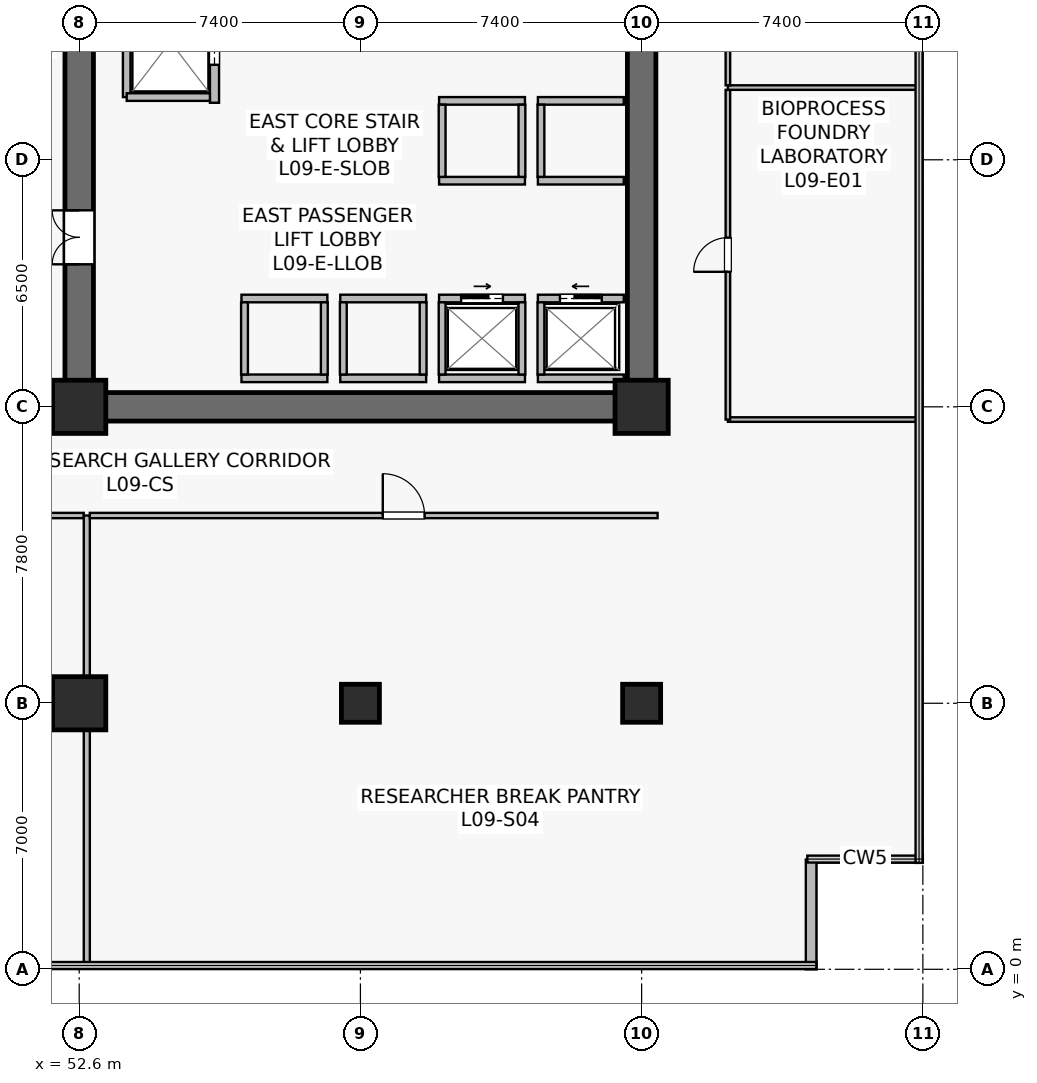
"""IFC4 building model, lengths in metres.
Left out: names, types, materials, properties, quantities, classifications, styles, units other than length and angle.
Written with IfcOpenShell. Run it as: python <this file> out.ifc"""

import sys

from ifc_helpers import new_model, si_unit, direction, frame, frame_2d, origin, origin_2d, place, context, subcontext, project, spatial, rectangle, extrude, source, transform, mapped, element, fill, save


model = new_model("IFC4")
c1 = context("Model", 3, precision=1e-05, world=origin(), true_north=direction((0.0, 1.0)))
c2 = subcontext(c1, "Body", "Model", "MODEL_VIEW")
j1 = project(units=[si_unit("LENGTHUNIT", "METRE"), si_unit("PLANEANGLEUNIT", "RADIAN")], contexts=[c1])
p1 = place(None, origin())
s1 = spatial("IfcSite", under=j1, at=p1, CompositionType="ELEMENT")
p2 = place(p1, origin())
s2 = spatial("IfcBuilding", under=s1, at=p2, CompositionType="ELEMENT")
p3 = place(p2, frame((0.0, 0.0, 37.5)))
s3 = spatial("IfcBuildingStorey", under=s2, at=p3, CompositionType="ELEMENT", Elevation=37.5)
p4 = place(p3, frame((52.225, 14.8, 0.0), z_axis=(0.0, 0.0, 1.0), x_axis=(1.0, 0.0, 0.0)))
e1 = element("IfcWall", 1, at=p4, inside=s3, PredefinedType="SHEAR", context=c2, shape_type="SweptSolid", body=[
    extrude(rectangle(XDim=15.55, YDim=0.75, at=frame_2d((7.775, 0.0))), origin(), (0.0, 0.0, 1.0), 3.78),
])
p5 = place(p3, frame((52.6, 15.175, 0.0), z_axis=(0.0, 0.0, 1.0), x_axis=(0.0, 1.0, 0.0)))
e2 = element("IfcWall", 2, at=p5, inside=s3, PredefinedType="SHEAR", context=c2, shape_type="SweptSolid", body=[
    extrude(rectangle(XDim=18.25, YDim=0.75, at=frame_2d((9.125, 0.0))), origin(), (0.0, 0.0, 1.0), 3.78),
])
p6 = place(p5, frame((3.375, 0.0, 0.0)))
e3 = element("IfcOpeningElement", 3, at=p6, cuts=e2, PredefinedType="OPENING", context=c2, shape_type="SweptSolid", body=[
    extrude(rectangle(XDim=1.42, YDim=2.2, at=frame_2d((0.71, 1.1))), frame((0.0, 0.385, 0.0), z_axis=(0.0, -1.0, 0.0), x_axis=(1.0, 0.0, 0.0)), (0.0, 0.0, 1.0), 0.77),
])
p7 = place(p3, frame((67.4, 15.175, 0.0), z_axis=(0.0, 0.0, 1.0), x_axis=(0.0, 1.0, 0.0)))
e4 = element("IfcWall", 4, at=p7, inside=s3, PredefinedType="SHEAR", context=c2, shape_type="SweptSolid", body=[
    extrude(rectangle(XDim=18.25, YDim=0.75, at=frame_2d((9.125, 0.0))), origin(), (0.0, 0.0, 1.0), 3.78),
])
m1 = source(origin(), c2, "Body", "SweptSolid", [
    extrude(rectangle(XDim=1.4, YDim=1.4, at=origin_2d()), origin(), (0.0, 0.0, 1.0), 4.1),
])
p8 = place(p3, frame((52.6, 7.0, 0.0), z_axis=(0.0, 0.0, 1.0), x_axis=(1.0, 0.0, 0.0)))
e5 = element("IfcColumn", 5, at=p8, inside=s3, PredefinedType="COLUMN", context=c2, shape_type="MappedRepresentation", body=[
    mapped(m1, transform((0.0, 0.0, 0.0), scale=1.0)),
])
m2 = source(origin(), c2, "Body", "SweptSolid", [
    extrude(rectangle(XDim=1.0, YDim=1.0, at=origin_2d()), origin(), (0.0, 0.0, 1.0), 4.1),
])
p9 = place(p3, frame((60.0, 7.0, 0.0), z_axis=(0.0, 0.0, 1.0), x_axis=(1.0, 0.0, 0.0)))
e6 = element("IfcColumn", 6, at=p9, inside=s3, PredefinedType="COLUMN", context=c2, shape_type="MappedRepresentation", body=[
    mapped(m2, transform((0.0, 0.0, 0.0), scale=1.0)),
])
for number, where, z_axis, x_axis in (
    (7, (52.6, 14.8, 0.0), (0.0, 0.0, 1.0), (1.0, 0.0, 0.0)),
    (8, (67.4, 14.8, 0.0), (0.0, 0.0, 1.0), (1.0, 0.0, 0.0)),
):
    element("IfcColumn", number, at=place(p3, frame(where, z_axis=z_axis, x_axis=x_axis)), inside=s3, PredefinedType="COLUMN", context=c2, shape_type="MappedRepresentation", body=[
        mapped(m1, transform((0.0, 0.0, 0.0), scale=1.0)),
    ])
p10 = place(p3, frame((67.4, 7.0, 0.0), z_axis=(0.0, 0.0, 1.0), x_axis=(1.0, 0.0, 0.0)))
e9 = element("IfcColumn", 9, at=p10, inside=s3, PredefinedType="COLUMN", context=c2, shape_type="MappedRepresentation", body=[
    mapped(m2, transform((0.0, 0.0, 0.0), scale=1.0)),
])
p11 = place(p3, frame((71.86, 0.0, 0.0), z_axis=(0.0, 0.0, 1.0), x_axis=(0.0, 1.0, 0.0)))
e10 = element("IfcWall", 10, at=p11, inside=s3, PredefinedType="STANDARD", context=c2, shape_type="SweptSolid", body=[
    extrude(rectangle(XDim=2.888, YDim=0.28, at=frame_2d((1.444, 0.0))), origin(), (0.0, 0.0, 1.0), 3.78),
])
p12 = place(p3, frame((56.16, 22.8, 0.0), z_axis=(0.0, 0.0, 1.0), x_axis=(0.0, 1.0, 0.0)))
e11 = element("IfcWall", 11, at=p12, inside=s3, PredefinedType="SOLIDWALL", context=c2, shape_type="SweptSolid", body=[
    extrude(rectangle(XDim=6.85, YDim=0.24, at=frame_2d((3.425, 0.0))), origin(), (0.0, 0.0, 1.0), 2.865),
])
p13 = place(p12, frame((4.85, 0.0, 0.0)))
e12 = element("IfcOpeningElement", 12, at=p13, cuts=e11, PredefinedType="OPENING", context=c2, shape_type="SweptSolid", body=[
    extrude(rectangle(XDim=1.1, YDim=2.22, at=frame_2d((0.55, 1.11))), frame((0.0, 0.13, 0.0), z_axis=(0.0, -1.0, 0.0), x_axis=(1.0, 0.0, 0.0)), (0.0, 0.0, 1.0), 0.26),
])
p14 = place(p12, frame((1.0, 0.0, 0.0)))
e13 = element("IfcOpeningElement", 13, at=p14, cuts=e11, PredefinedType="OPENING", context=c2, shape_type="SweptSolid", body=[
    extrude(rectangle(XDim=1.2, YDim=2.22, at=frame_2d((0.6, 1.11))), frame((0.0, 0.13, 0.0), z_axis=(0.0, -1.0, 0.0), x_axis=(1.0, 0.0, 0.0)), (0.0, 0.0, 1.0), 0.26),
])
p15 = place(p3, frame((64.67, 17.65, 0.0), z_axis=(0.0, 0.0, 1.0), x_axis=(1.0, 0.0, 0.0)))
e14 = element("IfcWall", 14, at=p15, inside=s3, PredefinedType="SOLIDWALL", context=c2, shape_type="SweptSolid", body=[
    extrude(rectangle(XDim=2.26, YDim=0.2, at=frame_2d((1.13, 0.0))), origin(), (0.0, 0.0, 1.0), 3.78),
])
p16 = place(p15, frame((0.58, 0.0, 0.0)))
e15 = element("IfcOpeningElement", 15, at=p16, cuts=e14, PredefinedType="OPENING", context=c2, shape_type="SweptSolid", body=[
    extrude(rectangle(XDim=1.1, YDim=2.22, at=frame_2d((0.55, 1.11))), frame((0.0, 0.11, 0.0), z_axis=(0.0, -1.0, 0.0), x_axis=(1.0, 0.0, 0.0)), (0.0, 0.0, 1.0), 0.22),
])
p17 = place(p3, frame((64.67, 15.55, 0.0), z_axis=(0.0, 0.0, 1.0), x_axis=(1.0, 0.0, 0.0)))
e16 = element("IfcWall", 16, at=p17, inside=s3, PredefinedType="SOLIDWALL", context=c2, shape_type="SweptSolid", body=[
    extrude(rectangle(XDim=2.26, YDim=0.2, at=frame_2d((1.13, 0.0))), origin(), (0.0, 0.0, 1.0), 3.78),
])
p18 = place(p3, frame((64.75, 15.65, 0.0), z_axis=(0.0, 0.0, 1.0), x_axis=(0.0, 1.0, 0.0)))
e17 = element("IfcWall", 17, at=p18, inside=s3, PredefinedType="SOLIDWALL", context=c2, shape_type="SweptSolid", body=[
    extrude(rectangle(XDim=1.9, YDim=0.18, at=frame_2d((0.95, 0.0))), origin(), (0.0, 0.0, 1.0), 3.78),
])
p19 = place(p3, frame((62.07, 17.65, 0.0), z_axis=(0.0, 0.0, 1.0), x_axis=(1.0, 0.0, 0.0)))
e18 = element("IfcWall", 18, at=p19, inside=s3, PredefinedType="SOLIDWALL", context=c2, shape_type="SweptSolid", body=[
    extrude(rectangle(XDim=2.26, YDim=0.2, at=frame_2d((1.13, 0.0))), origin(), (0.0, 0.0, 1.0), 3.78),
])
p20 = place(p19, frame((0.58, 0.0, 0.0)))
e19 = element("IfcOpeningElement", 19, at=p20, cuts=e18, PredefinedType="OPENING", context=c2, shape_type="SweptSolid", body=[
    extrude(rectangle(XDim=1.1, YDim=2.22, at=frame_2d((0.55, 1.11))), frame((0.0, 0.11, 0.0), z_axis=(0.0, -1.0, 0.0), x_axis=(1.0, 0.0, 0.0)), (0.0, 0.0, 1.0), 0.22),
])
p21 = place(p3, frame((62.07, 15.55, 0.0), z_axis=(0.0, 0.0, 1.0), x_axis=(1.0, 0.0, 0.0)))
e20 = element("IfcWall", 20, at=p21, inside=s3, PredefinedType="SOLIDWALL", context=c2, shape_type="SweptSolid", body=[
    extrude(rectangle(XDim=2.26, YDim=0.2, at=frame_2d((1.13, 0.0))), origin(), (0.0, 0.0, 1.0), 3.78),
])
for number, where, z_axis, x_axis in (
    (21, (62.15, 15.65, 0.0), (0.0, 0.0, 1.0), (0.0, 1.0, 0.0)),
    (22, (64.25, 15.65, 0.0), (0.0, 0.0, 1.0), (0.0, 1.0, 0.0)),
):
    element("IfcWall", number, at=place(p3, frame(where, z_axis=z_axis, x_axis=x_axis)), inside=s3, PredefinedType="SOLIDWALL", context=c2, shape_type="SweptSolid", body=[
        extrude(rectangle(XDim=1.9, YDim=0.18, at=frame_2d((0.95, 0.0))), origin(), (0.0, 0.0, 1.0), 3.78),
    ])
for number, where, z_axis, x_axis in (
    (23, (59.47, 17.65, 0.0), (0.0, 0.0, 1.0), (1.0, 0.0, 0.0)),
    (24, (59.47, 15.55, 0.0), (0.0, 0.0, 1.0), (1.0, 0.0, 0.0)),
):
    element("IfcWall", number, at=place(p3, frame(where, z_axis=z_axis, x_axis=x_axis)), inside=s3, PredefinedType="SOLIDWALL", context=c2, shape_type="SweptSolid", body=[
        extrude(rectangle(XDim=2.26, YDim=0.2, at=frame_2d((1.13, 0.0))), origin(), (0.0, 0.0, 1.0), 3.065),
    ])
for number, where, z_axis, x_axis in (
    (25, (59.55, 15.65, 0.0), (0.0, 0.0, 1.0), (0.0, 1.0, 0.0)),
    (26, (61.65, 15.65, 0.0), (0.0, 0.0, 1.0), (0.0, 1.0, 0.0)),
):
    element("IfcWall", number, at=place(p3, frame(where, z_axis=z_axis, x_axis=x_axis)), inside=s3, PredefinedType="SOLIDWALL", context=c2, shape_type="SweptSolid", body=[
        extrude(rectangle(XDim=1.9, YDim=0.18, at=frame_2d((0.95, 0.0))), origin(), (0.0, 0.0, 1.0), 3.78),
    ])
for number, where, z_axis, x_axis in (
    (27, (56.87, 17.65, 0.0), (0.0, 0.0, 1.0), (1.0, 0.0, 0.0)),
    (28, (56.87, 15.55, 0.0), (0.0, 0.0, 1.0), (1.0, 0.0, 0.0)),
):
    element("IfcWall", number, at=place(p3, frame(where, z_axis=z_axis, x_axis=x_axis)), inside=s3, PredefinedType="SOLIDWALL", context=c2, shape_type="SweptSolid", body=[
        extrude(rectangle(XDim=2.26, YDim=0.2, at=frame_2d((1.13, 0.0))), origin(), (0.0, 0.0, 1.0), 3.78),
    ])
for number, where, z_axis, x_axis in (
    (29, (56.95, 15.65, 0.0), (0.0, 0.0, 1.0), (0.0, 1.0, 0.0)),
    (30, (59.05, 15.65, 0.0), (0.0, 0.0, 1.0), (0.0, 1.0, 0.0)),
):
    element("IfcWall", number, at=place(p3, frame(where, z_axis=z_axis, x_axis=x_axis)), inside=s3, PredefinedType="SOLIDWALL", context=c2, shape_type="SweptSolid", body=[
        extrude(rectangle(XDim=1.9, YDim=0.18, at=frame_2d((0.95, 0.0))), origin(), (0.0, 0.0, 1.0), 3.78),
    ])
for number, where, z_axis, x_axis in (
    (31, (64.67, 20.75, 0.0), (0.0, 0.0, 1.0), (1.0, 0.0, 0.0)),
    (32, (64.67, 22.85, 0.0), (0.0, 0.0, 1.0), (1.0, 0.0, 0.0)),
):
    element("IfcWall", number, at=place(p3, frame(where, z_axis=z_axis, x_axis=x_axis)), inside=s3, PredefinedType="SOLIDWALL", context=c2, shape_type="SweptSolid", body=[
        extrude(rectangle(XDim=2.26, YDim=0.2, at=frame_2d((1.13, 0.0))), origin(), (0.0, 0.0, 1.0), 3.78),
    ])
p22 = place(p3, frame((64.75, 20.85, 0.0), z_axis=(0.0, 0.0, 1.0), x_axis=(0.0, 1.0, 0.0)))
e33 = element("IfcWall", 33, at=p22, inside=s3, PredefinedType="SOLIDWALL", context=c2, shape_type="SweptSolid", body=[
    extrude(rectangle(XDim=1.9, YDim=0.18, at=frame_2d((0.95, 0.0))), origin(), (0.0, 0.0, 1.0), 3.78),
])
for number, where, z_axis, x_axis in (
    (34, (62.07, 20.75, 0.0), (0.0, 0.0, 1.0), (1.0, 0.0, 0.0)),
    (35, (62.07, 22.85, 0.0), (0.0, 0.0, 1.0), (1.0, 0.0, 0.0)),
):
    element("IfcWall", number, at=place(p3, frame(where, z_axis=z_axis, x_axis=x_axis)), inside=s3, PredefinedType="SOLIDWALL", context=c2, shape_type="SweptSolid", body=[
        extrude(rectangle(XDim=2.26, YDim=0.2, at=frame_2d((1.13, 0.0))), origin(), (0.0, 0.0, 1.0), 3.78),
    ])
for number, where, z_axis, x_axis in (
    (36, (62.15, 20.85, 0.0), (0.0, 0.0, 1.0), (0.0, 1.0, 0.0)),
    (37, (64.25, 20.85, 0.0), (0.0, 0.0, 1.0), (0.0, 1.0, 0.0)),
):
    element("IfcWall", number, at=place(p3, frame(where, z_axis=z_axis, x_axis=x_axis)), inside=s3, PredefinedType="SOLIDWALL", context=c2, shape_type="SweptSolid", body=[
        extrude(rectangle(XDim=1.9, YDim=0.18, at=frame_2d((0.95, 0.0))), origin(), (0.0, 0.0, 1.0), 3.78),
    ])
p23 = place(p3, frame((53.85, 22.95, 0.0), z_axis=(0.0, 0.0, 1.0), x_axis=(0.0, 1.0, 0.0)))
e38 = element("IfcWall", 38, at=p23, inside=s3, PredefinedType="SOLIDWALL", context=c2, shape_type="SweptSolid", body=[
    extrude(rectangle(XDim=2.9, YDim=0.2, at=frame_2d((1.45, 0.0))), origin(), (0.0, 0.0, 1.0), 2.865),
])
p24 = place(p3, frame((53.85, 22.95, 0.0), z_axis=(0.0, 0.0, 1.0), x_axis=(1.0, 0.0, 0.0)))
e39 = element("IfcWall", 39, at=p24, inside=s3, PredefinedType="SOLIDWALL", context=c2, shape_type="SweptSolid", body=[
    extrude(rectangle(XDim=2.19, YDim=0.2, at=frame_2d((1.095, 0.0))), origin(), (0.0, 0.0, 1.0), 3.78),
])
p25 = place(p3, frame((34.68, 11.94, 0.0), z_axis=(0.0, 0.0, 1.0), x_axis=(1.0, 0.0, 0.0)))
e40 = element("IfcWall", 40, at=p25, inside=s3, PredefinedType="PARTITIONING", context=c2, shape_type="SweptSolid", body=[
    extrude(rectangle(XDim=18.04, YDim=0.14, at=frame_2d((9.02, 0.0))), origin(), (0.0, 0.0, 1.0), 3.065),
])
p26 = place(p25, frame((7.496, 0.0, 0.0)))
e41 = element("IfcOpeningElement", 41, at=p26, cuts=e40, PredefinedType="OPENING", context=c2, shape_type="SweptSolid", body=[
    extrude(rectangle(XDim=1.1, YDim=2.18, at=frame_2d((0.55, 1.09))), frame((0.0, 0.08, 0.0), z_axis=(0.0, -1.0, 0.0), x_axis=(1.0, 0.0, 0.0)), (0.0, 0.0, 1.0), 0.16),
])
p27 = place(p3, frame((52.8, 0.11, 0.0), z_axis=(0.0, 0.0, 1.0), x_axis=(0.0, 1.0, 0.0)))
e42 = element("IfcWall", 42, at=p27, inside=s3, PredefinedType="PARTITIONING", context=c2, shape_type="SweptSolid", body=[
    extrude(rectangle(XDim=11.83, YDim=0.16, at=frame_2d((5.915, 0.0))), origin(), (0.0, 0.0, 1.0), 3.015),
])
p28 = place(p3, frame((52.88, 11.94, 0.0), z_axis=(0.0, 0.0, 1.0), x_axis=(1.0, 0.0, 0.0)))
e43 = element("IfcWall", 43, at=p28, inside=s3, PredefinedType="PARTITIONING", context=c2, shape_type="SweptSolid", body=[
    extrude(rectangle(XDim=14.94, YDim=0.14, at=frame_2d((7.47, 0.0))), origin(), (0.0, 0.0, 1.0), 3.065),
])
p29 = place(p28, frame((7.708, 0.0, 0.0)))
e44 = element("IfcOpeningElement", 44, at=p29, cuts=e43, PredefinedType="OPENING", context=c2, shape_type="SweptSolid", body=[
    extrude(rectangle(XDim=1.1, YDim=2.18, at=frame_2d((0.55, 1.09))), frame((0.0, 0.08, 0.0), z_axis=(0.0, -1.0, 0.0), x_axis=(1.0, 0.0, 0.0)), (0.0, 0.0, 1.0), 0.16),
])
p30 = place(p3, frame((69.67, 14.465, 0.0), z_axis=(0.0, 0.0, 1.0), x_axis=(1.0, 0.0, 0.0)))
e45 = element("IfcWall", 45, at=p30, inside=s3, PredefinedType="PARTITIONING", context=c2, shape_type="SweptSolid", body=[
    extrude(rectangle(XDim=5.02, YDim=0.12, at=frame_2d((2.51, 0.0))), origin(), (0.0, 0.0, 1.0), 3.78),
])
p31 = place(p3, frame((69.67, 14.465, 0.0), z_axis=(0.0, 0.0, 1.0), x_axis=(0.0, 1.0, 0.0)))
e46 = element("IfcWall", 46, at=p31, inside=s3, PredefinedType="PARTITIONING", context=c2, shape_type="SweptSolid", body=[
    extrude(rectangle(XDim=8.675, YDim=0.12, at=frame_2d((4.337, 0.0))), origin(), (0.0, 0.0, 1.0), 3.78),
])
p32 = place(p31, frame((3.887, 0.0, 0.0)))
e47 = element("IfcOpeningElement", 47, at=p32, cuts=e46, PredefinedType="OPENING", context=c2, shape_type="SweptSolid", body=[
    extrude(rectangle(XDim=0.9, YDim=2.1, at=frame_2d((0.45, 1.05))), frame((0.0, 0.07, 0.0), z_axis=(0.0, -1.0, 0.0), x_axis=(1.0, 0.0, 0.0)), (0.0, 0.0, 1.0), 0.14),
])
p33 = place(p3, frame((69.67, 23.2, 0.0), z_axis=(0.0, 0.0, 1.0), x_axis=(1.0, 0.0, 0.0)))
e48 = element("IfcWall", 48, at=p33, inside=s3, PredefinedType="PARTITIONING", context=c2, shape_type="SweptSolid", body=[
    extrude(rectangle(XDim=5.02, YDim=0.12, at=frame_2d((2.51, 0.0))), origin(), (0.0, 0.0, 1.0), 3.78),
])
p34 = place(p3, frame((69.67, 23.26, 0.0), z_axis=(0.0, 0.0, 1.0), x_axis=(0.0, 1.0, 0.0)))
e49 = element("IfcWall", 49, at=p34, inside=s3, PredefinedType="PARTITIONING", context=c2, shape_type="SweptSolid", body=[
    extrude(rectangle(XDim=10.875, YDim=0.12, at=frame_2d((5.438, 0.0))), origin(), (0.0, 0.0, 1.0), 3.78),
])
p35 = place(p34, frame((4.988, 0.0, 0.0)))
e50 = element("IfcOpeningElement", 50, at=p35, cuts=e49, PredefinedType="OPENING", context=c2, shape_type="SweptSolid", body=[
    extrude(rectangle(XDim=0.9, YDim=2.1, at=frame_2d((0.45, 1.05))), frame((0.0, 0.07, 0.0), z_axis=(0.0, -1.0, 0.0), x_axis=(1.0, 0.0, 0.0)), (0.0, 0.0, 1.0), 0.14),
])
m3 = source(origin(), c2, "Body", "SweptSolid", [
    extrude(rectangle(XDim=1.1, YDim=2.22, at=frame_2d((0.55, 1.11))), frame((0.0, 0.025, 0.0), z_axis=(0.0, -1.0, 0.0), x_axis=(1.0, 0.0, 0.0)), (0.0, 0.0, 1.0), 0.05),
])
p36 = place(p16, origin())
e51 = element("IfcDoor", 51, at=p36, inside=s3, OperationType="SLIDING_TO_LEFT", PredefinedType="USERDEFINED", context=c2, shape_type="MappedRepresentation", body=[
    mapped(m3, transform((0.0, 0.0, 0.0), scale=1.0)),
])
fill(e15, e51)
p37 = place(p20, origin())
e52 = element("IfcDoor", 52, at=p37, inside=s3, OperationType="SLIDING_TO_RIGHT", PredefinedType="USERDEFINED", context=c2, shape_type="MappedRepresentation", body=[
    mapped(m3, transform((0.0, 0.0, 0.0), scale=1.0)),
])
fill(e19, e52)
m4 = source(origin(), c2, "Body", "SweptSolid", [
    extrude(rectangle(XDim=1.2, YDim=2.22, at=frame_2d((0.6, 1.11))), frame((0.0, 0.025, 0.0), z_axis=(0.0, -1.0, 0.0), x_axis=(1.0, 0.0, 0.0)), (0.0, 0.0, 1.0), 0.05),
])
p38 = place(p14, origin())
e53 = element("IfcDoor", 53, at=p38, inside=s3, OperationType="SLIDING_TO_LEFT", PredefinedType="USERDEFINED", context=c2, shape_type="MappedRepresentation", body=[
    mapped(m4, transform((0.0, 0.0, 0.0), scale=1.0)),
])
fill(e13, e53)
m5 = source(origin(), c2, "Body", "SweptSolid", [
    extrude(rectangle(XDim=1.42, YDim=2.2, at=frame_2d((0.71, 1.1))), frame((0.0, 0.025, 0.0), z_axis=(0.0, -1.0, 0.0), x_axis=(1.0, 0.0, 0.0)), (0.0, 0.0, 1.0), 0.05),
])
p39 = place(p6, origin())
e54 = element("IfcDoor", 54, at=p39, inside=s3, OperationType="DOUBLE_DOOR_SINGLE_SWING", PredefinedType="DOOR", context=c2, shape_type="MappedRepresentation", body=[
    mapped(m5, transform((0.0, 0.0, 0.0), scale=1.0)),
])
fill(e3, e54)
m6 = source(origin(), c2, "Body", "SweptSolid", [
    extrude(rectangle(XDim=1.1, YDim=2.18, at=frame_2d((0.55, 1.09))), frame((0.0, 0.025, 0.0), z_axis=(0.0, -1.0, 0.0), x_axis=(1.0, 0.0, 0.0)), (0.0, 0.0, 1.0), 0.05),
])
p40 = place(p29, origin())
e55 = element("IfcDoor", 55, at=p40, inside=s3, OperationType="SINGLE_SWING_LEFT", PredefinedType="DOOR", context=c2, shape_type="MappedRepresentation", body=[
    mapped(m6, transform((0.0, 0.0, 0.0), scale=1.0)),
])
fill(e44, e55)
m7 = source(origin(), c2, "Body", "SweptSolid", [
    extrude(rectangle(XDim=0.9, YDim=2.1, at=frame_2d((0.45, 1.05))), frame((0.0, 0.025, 0.0), z_axis=(0.0, -1.0, 0.0), x_axis=(1.0, 0.0, 0.0)), (0.0, 0.0, 1.0), 0.05),
])
p41 = place(p32, origin())
e56 = element("IfcDoor", 56, at=p41, inside=s3, OperationType="SINGLE_SWING_LEFT", PredefinedType="DOOR", context=c2, shape_type="MappedRepresentation", body=[
    mapped(m7, transform((0.0, 0.0, 0.0), scale=1.0)),
])
fill(e47, e56)
save(model, sys.argv[1])
